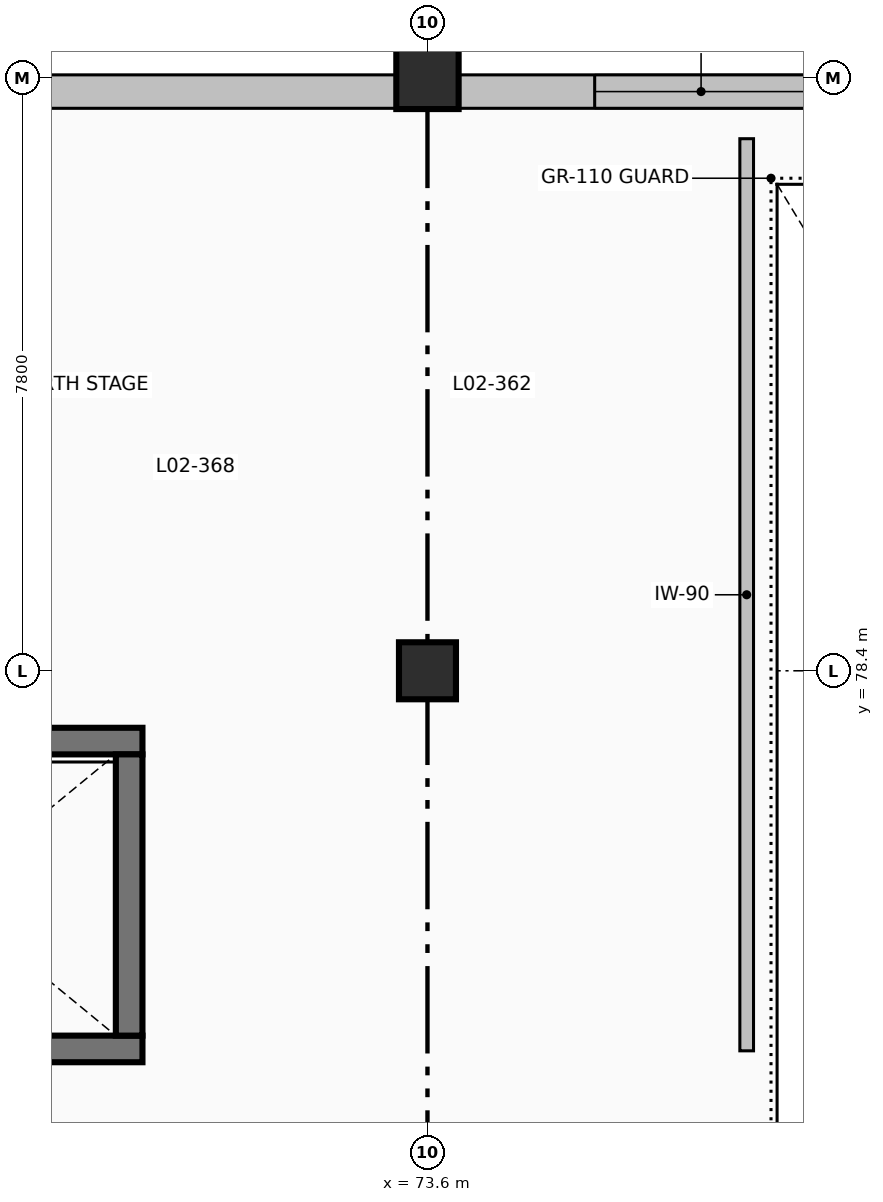
"""IFC4 building model, lengths in metres.
Left out: names, types, materials, properties, quantities, classifications, styles, units other than length and angle.
Written with IfcOpenShell. Run it as: python <this file> out.ifc"""

import sys

from ifc_helpers import new_model, si_unit, direction, frame, frame_2d, origin, origin_2d, place, context, subcontext, project, spatial, rectangle, extrude, element, fill, save


model = new_model("IFC4")
c1 = context("Model", 3, precision=1e-05, world=origin(), true_north=direction((0.0, 1.0)))
c2 = subcontext(c1, "Body", "Model", "MODEL_VIEW")
j1 = project(units=[si_unit("LENGTHUNIT", "METRE"), si_unit("PLANEANGLEUNIT", "RADIAN")], contexts=[c1])
p1 = place(None, origin())
s1 = spatial("IfcSite", under=j1, at=p1, CompositionType="ELEMENT")
p2 = place(p1, origin())
s2 = spatial("IfcBuilding", under=s1, at=p2, CompositionType="ELEMENT")
p3 = place(p2, frame((0.0, 0.0, 10.2)))
s3 = spatial("IfcBuildingStorey", under=s2, at=p3, CompositionType="ELEMENT", Elevation=10.2)
p4 = place(p3, frame((73.6, 78.4, 0.0), z_axis=(0.0, 0.0, 1.0), x_axis=(1.0, 0.0, 0.0)))
e1 = element("IfcColumn", 1, at=p4, inside=s3, PredefinedType="COLUMN", context=c2, shape_type="SweptSolid", body=[
    extrude(rectangle(XDim=0.75, YDim=0.75, at=origin_2d()), origin(), (0.0, 0.0, 1.0), 4.8),
])
p5 = place(p3, frame((73.6, 86.2, 0.0), z_axis=(0.0, 0.0, 1.0), x_axis=(1.0, 0.0, 0.0)))
e2 = element("IfcColumn", 2, at=p5, inside=s3, PredefinedType="COLUMN", context=c2, shape_type="SweptSolid", body=[
    extrude(rectangle(XDim=0.82, YDim=0.82, at=origin_2d()), origin(), (0.0, 0.0, 1.0), 4.8),
])
for number, where, z_axis, x_axis in (
    (3, (61.45, 73.425, 0.0), (0.0, 0.0, 1.0), (1.0, 0.0, 0.0)),
    (4, (69.85, 77.475, 0.0), (0.0, 0.0, 1.0), (-1.0, 0.0, 0.0)),
):
    element("IfcWall", number, at=place(p3, frame(where, z_axis=z_axis, x_axis=x_axis)), inside=s3, PredefinedType="SHEAR", context=c2, shape_type="SweptSolid", body=[
        extrude(rectangle(XDim=8.4, YDim=0.35, at=frame_2d((4.2, 0.0))), origin(), (0.0, 0.0, 1.0), 4.48),
    ])
p6 = place(p3, frame((69.675, 77.3, 0.0), z_axis=(0.0, 0.0, 1.0), x_axis=(0.0, -1.0, 0.0)))
e5 = element("IfcWall", 5, at=p6, inside=s3, PredefinedType="SHEAR", context=c2, shape_type="SweptSolid", body=[
    extrude(rectangle(XDim=3.7, YDim=0.35, at=frame_2d((1.85, 0.0))), origin(), (0.0, 0.0, 1.0), 4.48),
])
p7 = place(p3, frame((66.81, 86.02, 0.0), z_axis=(0.0, 0.0, 1.0), x_axis=(1.0, 0.0, 0.0)))
e6 = element("IfcWall", 6, at=p7, inside=s3, PredefinedType="SOLIDWALL", context=c2, shape_type="SweptSolid", body=[
    extrude(rectangle(XDim=6.38, YDim=0.44, at=frame_2d((3.19, 0.0))), origin(), (0.0, 0.0, 1.0), 3.722),
])
p8 = place(p3, frame((74.01, 86.02, 0.0), z_axis=(0.0, 0.0, 1.0), x_axis=(1.0, 0.0, 0.0)))
e7 = element("IfcWall", 7, at=p8, inside=s3, PredefinedType="SOLIDWALL", context=c2, shape_type="SweptSolid", body=[
    extrude(rectangle(XDim=6.38, YDim=0.44, at=frame_2d((3.19, 0.0))), origin(), (0.0, 0.0, 1.0), 3.722),
])
p9 = place(p8, frame((1.79, 0.0, 1.05)))
e8 = element("IfcOpeningElement", 8, at=p9, cuts=e7, PredefinedType="OPENING", context=c2, shape_type="SweptSolid", body=[
    extrude(rectangle(XDim=2.8, YDim=1.35, at=frame_2d((1.4, 0.675))), frame((0.0, 0.23, 0.0), z_axis=(0.0, -1.0, 0.0), x_axis=(1.0, 0.0, 0.0)), (0.0, 0.0, 1.0), 0.46),
])
p10 = place(p3, frame((77.8, 73.4, 0.0), z_axis=(0.0, 0.0, 1.0), x_axis=(0.0, 1.0, 0.0)))
e9 = element("IfcWall", 9, at=p10, inside=s3, PredefinedType="PARTITIONING", context=c2, shape_type="SweptSolid", body=[
    extrude(rectangle(XDim=12.0, YDim=0.18, at=frame_2d((6.0, 0.0))), origin(), (0.0, 0.0, 1.0), 4.492),
])
p11 = place(p9, origin())
e10 = element("IfcWindow", 10, at=p11, inside=s3, PartitioningType="SINGLE_PANEL", PredefinedType="WINDOW", context=c2, shape_type="SweptSolid", body=[
    extrude(rectangle(XDim=2.8, YDim=1.35, at=frame_2d((1.4, 0.675))), frame((0.0, 0.03, 0.0), z_axis=(0.0, -1.0, 0.0), x_axis=(1.0, 0.0, 0.0)), (0.0, 0.0, 1.0), 0.06),
])
fill(e8, e10)
save(model, sys.argv[1])
